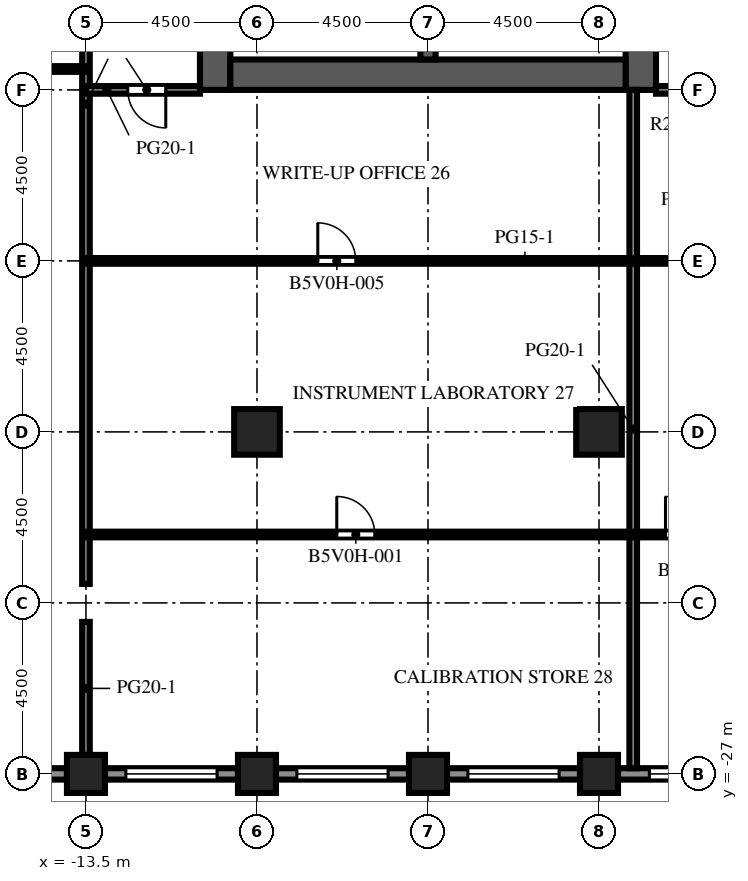
"""IFC4 building model, lengths in metres.
Left out: names, types, materials, properties, quantities, classifications, styles, units other than length and angle.
Written with IfcOpenShell. Run it as: python <this file> out.ifc"""

import sys

from ifc_helpers import new_model, si_unit, direction, frame, frame_2d, origin, origin_2d, place, context, subcontext, project, spatial, rectangle, extrude, element, fill, save


model = new_model("IFC4")
c1 = context("Model", 3, precision=1e-05, world=origin(), true_north=direction((0.0, 1.0)))
c2 = subcontext(c1, "Body", "Model", "MODEL_VIEW")
j1 = project(units=[si_unit("LENGTHUNIT", "METRE"), si_unit("PLANEANGLEUNIT", "RADIAN")], contexts=[c1])
p1 = place(None, origin())
s1 = spatial("IfcSite", under=j1, at=p1, CompositionType="ELEMENT")
p2 = place(p1, origin())
s2 = spatial("IfcBuilding", under=s1, at=p2, CompositionType="ELEMENT")
p3 = place(p2, frame((0.0, 0.0, 156.8)))
s3 = spatial("IfcBuildingStorey", under=s2, at=p3, CompositionType="ELEMENT", Elevation=156.8)
for number, where, z_axis, x_axis in (
    (1, (-13.5, -27.0, -0.45), (0.0, 0.0, 1.0), (1.0, 0.0, 0.0)),
    (2, (-9.0, -27.0, -0.45), (0.0, 0.0, 1.0), (1.0, 0.0, 0.0)),
    (3, (-4.5, -27.0, -0.45), (0.0, 0.0, 1.0), (1.0, 0.0, 0.0)),
    (4, (0.0, -27.0, -0.45), (0.0, 0.0, 1.0), (1.0, 0.0, 0.0)),
):
    element("IfcColumn", number, at=place(p3, frame(where, z_axis=z_axis, x_axis=x_axis)), inside=s3, PredefinedType="COLUMN", context=c2, shape_type="SweptSolid", body=[
        extrude(rectangle(XDim=1.0, YDim=1.0, at=origin_2d()), origin(), (0.0, 0.0, 1.0), 4.55),
    ])
for number, where, z_axis, x_axis in (
    (5, (-9.0, -18.0, -0.45), (0.0, 0.0, 1.0), (1.0, 0.0, 0.0)),
    (6, (0.0, -18.0, -0.45), (0.0, 0.0, 1.0), (1.0, 0.0, 0.0)),
):
    element("IfcColumn", number, at=place(p3, frame(where, z_axis=z_axis, x_axis=x_axis)), inside=s3, PredefinedType="COLUMN", context=c2, shape_type="SweptSolid", body=[
        extrude(rectangle(XDim=1.2, YDim=1.2, at=origin_2d()), origin(), (0.0, 0.0, 1.0), 4.55),
    ])
p4 = place(p3, frame((-10.1, -9.0, 0.0), z_axis=(0.0, 0.0, 1.0), x_axis=(0.0, 1.0, 0.0)))
e7 = element("IfcWall", 7, at=p4, inside=s3, PredefinedType="SHEAR", context=c2, shape_type="SweptSolid", body=[
    extrude(rectangle(XDim=27.5, YDim=0.8, at=frame_2d((13.75, 0.0))), origin(), (0.0, 0.0, 1.0), 4.1),
])
p5 = place(p4, frame((12.55, 0.0, 0.0)))
e8 = element("IfcOpeningElement", 8, at=p5, cuts=e7, PredefinedType="OPENING", context=c2, shape_type="SweptSolid", body=[
    extrude(rectangle(XDim=2.4, YDim=2.4, at=frame_2d((1.2, 1.2))), frame((0.0, 0.41, 0.0), z_axis=(0.0, -1.0, 0.0), x_axis=(1.0, 0.0, 0.0)), (0.0, 0.0, 1.0), 0.82),
])
p6 = place(p4, frame((6.825, 0.0, 0.0)))
e9 = element("IfcOpeningElement", 9, at=p6, cuts=e7, PredefinedType="OPENING", context=c2, shape_type="SweptSolid", body=[
    extrude(rectangle(XDim=1.2, YDim=2.1, at=frame_2d((0.6, 1.05))), frame((0.0, 0.41, 0.0), z_axis=(0.0, -1.0, 0.0), x_axis=(1.0, 0.0, 0.0)), (0.0, 0.0, 1.0), 0.82),
])
p7 = place(p4, frame((19.475, 0.0, 0.0)))
e10 = element("IfcOpeningElement", 10, at=p7, cuts=e7, PredefinedType="OPENING", context=c2, shape_type="SweptSolid", body=[
    extrude(rectangle(XDim=1.2, YDim=2.1, at=frame_2d((0.6, 1.05))), frame((0.0, 0.41, 0.0), z_axis=(0.0, -1.0, 0.0), x_axis=(1.0, 0.0, 0.0)), (0.0, 0.0, 1.0), 0.82),
])
p8 = place(p3, frame((1.1, -9.0, 0.0), z_axis=(0.0, 0.0, 1.0), x_axis=(0.0, 1.0, 0.0)))
e11 = element("IfcWall", 11, at=p8, inside=s3, PredefinedType="SHEAR", context=c2, shape_type="SweptSolid", body=[
    extrude(rectangle(XDim=27.5, YDim=0.8, at=frame_2d((13.75, 0.0))), origin(), (0.0, 0.0, 1.0), 4.1),
])
p9 = place(p8, frame((12.55, 0.0, 0.0)))
e12 = element("IfcOpeningElement", 12, at=p9, cuts=e11, PredefinedType="OPENING", context=c2, shape_type="SweptSolid", body=[
    extrude(rectangle(XDim=2.4, YDim=2.4, at=frame_2d((1.2, 1.2))), frame((0.0, 0.41, 0.0), z_axis=(0.0, -1.0, 0.0), x_axis=(1.0, 0.0, 0.0)), (0.0, 0.0, 1.0), 0.82),
])
p10 = place(p8, frame((5.45, 0.0, 0.0)))
e13 = element("IfcOpeningElement", 13, at=p10, cuts=e11, PredefinedType="OPENING", context=c2, shape_type="SweptSolid", body=[
    extrude(rectangle(XDim=1.2, YDim=2.1, at=frame_2d((0.6, 1.05))), frame((0.0, 0.41, 0.0), z_axis=(0.0, -1.0, 0.0), x_axis=(1.0, 0.0, 0.0)), (0.0, 0.0, 1.0), 0.82),
])
p11 = place(p8, frame((19.45, 0.0, 0.0)))
e14 = element("IfcOpeningElement", 14, at=p11, cuts=e11, PredefinedType="OPENING", context=c2, shape_type="SweptSolid", body=[
    extrude(rectangle(XDim=1.0, YDim=2.1, at=frame_2d((0.5, 1.05))), frame((0.0, 0.41, 0.0), z_axis=(0.0, -1.0, 0.0), x_axis=(1.0, 0.0, 0.0)), (0.0, 0.0, 1.0), 0.82),
])
p12 = place(p8, frame((21.137, 0.0, 0.0)))
e15 = element("IfcOpeningElement", 15, at=p12, cuts=e11, PredefinedType="OPENING", context=c2, shape_type="SweptSolid", body=[
    extrude(rectangle(XDim=1.0, YDim=2.1, at=frame_2d((0.5, 1.05))), frame((0.0, 0.41, 0.0), z_axis=(0.0, -1.0, 0.0), x_axis=(1.0, 0.0, 0.0)), (0.0, 0.0, 1.0), 0.82),
])
p13 = place(p8, frame((23.2, 0.0, 0.0)))
e16 = element("IfcOpeningElement", 16, at=p13, cuts=e11, PredefinedType="OPENING", context=c2, shape_type="SweptSolid", body=[
    extrude(rectangle(XDim=1.0, YDim=2.1, at=frame_2d((0.5, 1.05))), frame((0.0, 0.41, 0.0), z_axis=(0.0, -1.0, 0.0), x_axis=(1.0, 0.0, 0.0)), (0.0, 0.0, 1.0), 0.82),
])
p14 = place(p8, frame((25.262, 0.0, 0.0)))
e17 = element("IfcOpeningElement", 17, at=p14, cuts=e11, PredefinedType="OPENING", context=c2, shape_type="SweptSolid", body=[
    extrude(rectangle(XDim=1.0, YDim=2.1, at=frame_2d((0.5, 1.05))), frame((0.0, 0.41, 0.0), z_axis=(0.0, -1.0, 0.0), x_axis=(1.0, 0.0, 0.0)), (0.0, 0.0, 1.0), 0.82),
])
p15 = place(p3, frame((-9.7, -8.6, 0.0), z_axis=(0.0, 0.0, 1.0), x_axis=(1.0, 0.0, 0.0)))
e18 = element("IfcWall", 18, at=p15, inside=s3, PredefinedType="SHEAR", context=c2, shape_type="SweptSolid", body=[
    extrude(rectangle(XDim=10.4, YDim=0.8, at=frame_2d((5.2, 0.0))), origin(), (0.0, 0.0, 1.0), 4.1),
])
p16 = place(p3, frame((-4.5, -8.2, 0.0), z_axis=(0.0, 0.0, 1.0), x_axis=(0.0, 1.0, 0.0)))
e19 = element("IfcWall", 19, at=p16, inside=s3, PredefinedType="SHEAR", context=c2, shape_type="SweptSolid", body=[
    extrude(rectangle(XDim=7.5, YDim=0.4, at=frame_2d((3.75, 0.0))), origin(), (0.0, 0.0, 1.0), 4.1),
])
p17 = place(p3, frame((-14.0, -27.0, 0.0), z_axis=(0.0, 0.0, 1.0), x_axis=(-1.0, 0.0, 0.0)))
e20 = element("IfcWall", 20, at=p17, inside=s3, PredefinedType="SOLIDWALL", context=c2, shape_type="SweptSolid", body=[
    extrude(rectangle(XDim=3.5, YDim=0.3, at=frame_2d((1.75, 0.0))), origin(), (0.0, 0.0, 1.0), 2.85),
])
p18 = place(p17, frame((1.25, 0.0, 0.0)))
e21 = element("IfcOpeningElement", 21, at=p18, cuts=e20, PredefinedType="OPENING", context=c2, shape_type="SweptSolid", body=[
    extrude(rectangle(XDim=1.0, YDim=2.2, at=frame_2d((0.5, 1.1))), frame((0.0, 0.16, 0.0), z_axis=(0.0, -1.0, 0.0), x_axis=(1.0, 0.0, 0.0)), (0.0, 0.0, 1.0), 0.32),
])
p19 = place(p3, frame((-9.5, -27.0, 0.0), z_axis=(0.0, 0.0, 1.0), x_axis=(-1.0, 0.0, 0.0)))
e22 = element("IfcWall", 22, at=p19, inside=s3, PredefinedType="SOLIDWALL", context=c2, shape_type="SweptSolid", body=[
    extrude(rectangle(XDim=3.5, YDim=0.3, at=frame_2d((1.75, 0.0))), origin(), (0.0, 0.0, 1.0), 2.85),
])
p20 = place(p19, frame((0.55, 0.0, 0.8)))
e23 = element("IfcOpeningElement", 23, at=p20, cuts=e22, PredefinedType="OPENING", context=c2, shape_type="SweptSolid", body=[
    extrude(rectangle(XDim=2.4, YDim=1.7, at=frame_2d((1.2, 0.85))), frame((0.0, 0.16, 0.0), z_axis=(0.0, -1.0, 0.0), x_axis=(1.0, 0.0, 0.0)), (0.0, 0.0, 1.0), 0.32),
])
p21 = place(p3, frame((-5.0, -27.0, 0.0), z_axis=(0.0, 0.0, 1.0), x_axis=(-1.0, 0.0, 0.0)))
e24 = element("IfcWall", 24, at=p21, inside=s3, PredefinedType="SOLIDWALL", context=c2, shape_type="SweptSolid", body=[
    extrude(rectangle(XDim=3.5, YDim=0.3, at=frame_2d((1.75, 0.0))), origin(), (0.0, 0.0, 1.0), 2.85),
])
p22 = place(p21, frame((0.55, 0.0, 0.8)))
e25 = element("IfcOpeningElement", 25, at=p22, cuts=e24, PredefinedType="OPENING", context=c2, shape_type="SweptSolid", body=[
    extrude(rectangle(XDim=2.4, YDim=1.7, at=frame_2d((1.2, 0.85))), frame((0.0, 0.16, 0.0), z_axis=(0.0, -1.0, 0.0), x_axis=(1.0, 0.0, 0.0)), (0.0, 0.0, 1.0), 0.32),
])
p23 = place(p3, frame((-0.5, -27.0, 0.0), z_axis=(0.0, 0.0, 1.0), x_axis=(-1.0, 0.0, 0.0)))
e26 = element("IfcWall", 26, at=p23, inside=s3, PredefinedType="SOLIDWALL", context=c2, shape_type="SweptSolid", body=[
    extrude(rectangle(XDim=3.5, YDim=0.3, at=frame_2d((1.75, 0.0))), origin(), (0.0, 0.0, 1.0), 2.85),
])
p24 = place(p23, frame((0.55, 0.0, 0.8)))
e27 = element("IfcOpeningElement", 27, at=p24, cuts=e26, PredefinedType="OPENING", context=c2, shape_type="SweptSolid", body=[
    extrude(rectangle(XDim=2.4, YDim=1.7, at=frame_2d((1.2, 0.85))), frame((0.0, 0.16, 0.0), z_axis=(0.0, -1.0, 0.0), x_axis=(1.0, 0.0, 0.0)), (0.0, 0.0, 1.0), 0.32),
])
p25 = place(p3, frame((4.0, -27.0, 0.0), z_axis=(0.0, 0.0, 1.0), x_axis=(-1.0, 0.0, 0.0)))
e28 = element("IfcWall", 28, at=p25, inside=s3, PredefinedType="SOLIDWALL", context=c2, shape_type="SweptSolid", body=[
    extrude(rectangle(XDim=3.5, YDim=0.3, at=frame_2d((1.75, 0.0))), origin(), (0.0, 0.0, 1.0), 2.85),
])
p26 = place(p25, frame((0.275, 0.0, 0.8)))
e29 = element("IfcOpeningElement", 29, at=p26, cuts=e28, PredefinedType="OPENING", context=c2, shape_type="SweptSolid", body=[
    extrude(rectangle(XDim=2.4, YDim=1.7, at=frame_2d((1.2, 0.85))), frame((0.0, 0.16, 0.0), z_axis=(0.0, -1.0, 0.0), x_axis=(1.0, 0.0, 0.0)), (0.0, 0.0, 1.0), 0.32),
])
p27 = place(p3, frame((-13.5, -26.5, 0.0), z_axis=(0.0, 0.0, 1.0), x_axis=(0.0, 1.0, 0.0)))
e30 = element("IfcWall", 30, at=p27, inside=s3, PredefinedType="PARTITIONING", context=c2, shape_type="SweptSolid", body=[
    extrude(rectangle(XDim=3.5, YDim=0.2, at=frame_2d((1.75, 0.0))), origin(), (0.0, 0.0, 1.0), 3.65),
])
p28 = place(p3, frame((-13.5, -22.0, 0.0), z_axis=(0.0, 0.0, 1.0), x_axis=(0.0, 1.0, 0.0)))
e31 = element("IfcWall", 31, at=p28, inside=s3, PredefinedType="PARTITIONING", context=c2, shape_type="SweptSolid", body=[
    extrude(rectangle(XDim=25.25, YDim=0.2, at=frame_2d((12.625, 0.0))), origin(), (0.0, 0.0, 1.0), 3.65),
])
p29 = place(p3, frame((0.9, -26.85, 0.0), z_axis=(0.0, 0.0, 1.0), x_axis=(0.0, 1.0, 0.0)))
e32 = element("IfcWall", 32, at=p29, inside=s3, PredefinedType="PARTITIONING", context=c2, shape_type="SweptSolid", body=[
    extrude(rectangle(XDim=17.85, YDim=0.2, at=frame_2d((8.925, 0.0))), origin(), (0.0, 0.0, 1.0), 3.65),
])
p30 = place(p3, frame((21.0, -20.7, 0.0), z_axis=(0.0, 0.0, 1.0), x_axis=(-1.0, 0.0, 0.0)))
e33 = element("IfcWall", 33, at=p30, inside=s3, PredefinedType="PARTITIONING", context=c2, shape_type="SweptSolid", body=[
    extrude(rectangle(XDim=34.5, YDim=0.15, at=frame_2d((17.25, 0.0))), origin(), (0.0, 0.0, 1.0), 3.65),
])
p31 = place(p30, frame((26.9, 0.0, 0.0)))
e34 = element("IfcOpeningElement", 34, at=p31, cuts=e33, PredefinedType="OPENING", context=c2, shape_type="SweptSolid", body=[
    extrude(rectangle(XDim=1.0, YDim=2.1, at=frame_2d((0.5, 1.05))), frame((0.0, 0.085, 0.0), z_axis=(0.0, -1.0, 0.0), x_axis=(1.0, 0.0, 0.0)), (0.0, 0.0, 1.0), 0.17),
])
p32 = place(p30, frame((18.25, 0.0, 0.0)))
e35 = element("IfcOpeningElement", 35, at=p32, cuts=e33, PredefinedType="OPENING", context=c2, shape_type="SweptSolid", body=[
    extrude(rectangle(XDim=1.0, YDim=2.1, at=frame_2d((0.5, 1.05))), frame((0.0, 0.085, 0.0), z_axis=(0.0, -1.0, 0.0), x_axis=(1.0, 0.0, 0.0)), (0.0, 0.0, 1.0), 0.17),
])
p33 = place(p30, frame((12.65, 0.0, 0.0)))
e36 = element("IfcOpeningElement", 36, at=p33, cuts=e33, PredefinedType="OPENING", context=c2, shape_type="SweptSolid", body=[
    extrude(rectangle(XDim=1.0, YDim=2.1, at=frame_2d((0.5, 1.05))), frame((0.0, 0.085, 0.0), z_axis=(0.0, -1.0, 0.0), x_axis=(1.0, 0.0, 0.0)), (0.0, 0.0, 1.0), 0.17),
])
p34 = place(p30, frame((1.4, 0.0, 0.0)))
e37 = element("IfcOpeningElement", 37, at=p34, cuts=e33, PredefinedType="OPENING", context=c2, shape_type="SweptSolid", body=[
    extrude(rectangle(XDim=1.0, YDim=2.1, at=frame_2d((0.5, 1.05))), frame((0.0, 0.085, 0.0), z_axis=(0.0, -1.0, 0.0), x_axis=(1.0, 0.0, 0.0)), (0.0, 0.0, 1.0), 0.17),
])
p35 = place(p3, frame((21.0, -13.5, 0.0), z_axis=(0.0, 0.0, 1.0), x_axis=(-1.0, 0.0, 0.0)))
e38 = element("IfcWall", 38, at=p35, inside=s3, PredefinedType="PARTITIONING", context=c2, shape_type="SweptSolid", body=[
    extrude(rectangle(XDim=34.5, YDim=0.15, at=frame_2d((17.25, 0.0))), origin(), (0.0, 0.0, 1.0), 3.65),
])
p36 = place(p35, frame((27.4, 0.0, 0.0)))
e39 = element("IfcOpeningElement", 39, at=p36, cuts=e38, PredefinedType="OPENING", context=c2, shape_type="SweptSolid", body=[
    extrude(rectangle(XDim=1.0, YDim=2.1, at=frame_2d((0.5, 1.05))), frame((0.0, 0.085, 0.0), z_axis=(0.0, -1.0, 0.0), x_axis=(1.0, 0.0, 0.0)), (0.0, 0.0, 1.0), 0.17),
])
p37 = place(p35, frame((17.5, 0.0, 0.0)))
e40 = element("IfcOpeningElement", 40, at=p37, cuts=e38, PredefinedType="OPENING", context=c2, shape_type="SweptSolid", body=[
    extrude(rectangle(XDim=1.0, YDim=2.1, at=frame_2d((0.5, 1.05))), frame((0.0, 0.085, 0.0), z_axis=(0.0, -1.0, 0.0), x_axis=(1.0, 0.0, 0.0)), (0.0, 0.0, 1.0), 0.17),
])
p38 = place(p35, frame((10.4, 0.0, 0.0)))
e41 = element("IfcOpeningElement", 41, at=p38, cuts=e38, PredefinedType="OPENING", context=c2, shape_type="SweptSolid", body=[
    extrude(rectangle(XDim=1.0, YDim=2.1, at=frame_2d((0.5, 1.05))), frame((0.0, 0.085, 0.0), z_axis=(0.0, -1.0, 0.0), x_axis=(1.0, 0.0, 0.0)), (0.0, 0.0, 1.0), 0.17),
])
p39 = place(p35, frame((3.65, 0.0, 0.0)))
e42 = element("IfcOpeningElement", 42, at=p39, cuts=e38, PredefinedType="OPENING", context=c2, shape_type="SweptSolid", body=[
    extrude(rectangle(XDim=1.0, YDim=2.1, at=frame_2d((0.5, 1.05))), frame((0.0, 0.085, 0.0), z_axis=(0.0, -1.0, 0.0), x_axis=(1.0, 0.0, 0.0)), (0.0, 0.0, 1.0), 0.17),
])
p40 = place(p3, frame((-10.5, -9.0, 0.0), z_axis=(0.0, 0.0, 1.0), x_axis=(-1.0, 0.0, 0.0)))
e43 = element("IfcWall", 43, at=p40, inside=s3, PredefinedType="PARTITIONING", context=c2, shape_type="SweptSolid", body=[
    extrude(rectangle(XDim=3.0, YDim=0.2, at=frame_2d((1.5, 0.0))), origin(), (0.0, 0.0, 1.0), 3.65),
])
p41 = place(p40, frame((0.9, 0.0, 0.0)))
e44 = element("IfcOpeningElement", 44, at=p41, cuts=e43, PredefinedType="OPENING", context=c2, shape_type="SweptSolid", body=[
    extrude(rectangle(XDim=1.0, YDim=2.1, at=frame_2d((0.5, 1.05))), frame((0.0, 0.11, 0.0), z_axis=(0.0, -1.0, 0.0), x_axis=(1.0, 0.0, 0.0)), (0.0, 0.0, 1.0), 0.22),
])
p42 = place(p3, frame((6.0, -9.0, 0.0), z_axis=(0.0, 0.0, 1.0), x_axis=(-1.0, 0.0, 0.0)))
e45 = element("IfcWall", 45, at=p42, inside=s3, PredefinedType="PARTITIONING", context=c2, shape_type="SweptSolid", body=[
    extrude(rectangle(XDim=4.5, YDim=0.2, at=frame_2d((2.25, 0.0))), origin(), (0.0, 0.0, 1.0), 3.65),
])
p43 = place(p42, frame((1.65, 0.0, 0.0)))
e46 = element("IfcOpeningElement", 46, at=p43, cuts=e45, PredefinedType="OPENING", context=c2, shape_type="SweptSolid", body=[
    extrude(rectangle(XDim=1.0, YDim=2.1, at=frame_2d((0.5, 1.05))), frame((0.0, 0.11, 0.0), z_axis=(0.0, -1.0, 0.0), x_axis=(1.0, 0.0, 0.0)), (0.0, 0.0, 1.0), 0.22),
])
p44 = place(p3, frame((-17.4, -8.45, 0.0), z_axis=(0.0, 0.0, 1.0), x_axis=(1.0, 0.0, 0.0)))
e47 = element("IfcWall", 47, at=p44, inside=s3, PredefinedType="PARTITIONING", context=c2, shape_type="SweptSolid", body=[
    extrude(rectangle(XDim=3.9, YDim=0.15, at=frame_2d((1.95, 0.0))), origin(), (0.0, 0.0, 1.0), 3.65),
])
p45 = place(p20, origin())
e48 = element("IfcWindow", 48, at=p45, inside=s3, PartitioningType="SINGLE_PANEL", PredefinedType="WINDOW", context=c2, shape_type="SweptSolid", body=[
    extrude(rectangle(XDim=2.4, YDim=1.7, at=frame_2d((1.2, 0.85))), frame((0.0, 0.03, 0.0), z_axis=(0.0, -1.0, 0.0), x_axis=(1.0, 0.0, 0.0)), (0.0, 0.0, 1.0), 0.06),
])
fill(e23, e48)
p46 = place(p22, origin())
e49 = element("IfcWindow", 49, at=p46, inside=s3, PartitioningType="SINGLE_PANEL", PredefinedType="WINDOW", context=c2, shape_type="SweptSolid", body=[
    extrude(rectangle(XDim=2.4, YDim=1.7, at=frame_2d((1.2, 0.85))), frame((0.0, 0.03, 0.0), z_axis=(0.0, -1.0, 0.0), x_axis=(1.0, 0.0, 0.0)), (0.0, 0.0, 1.0), 0.06),
])
fill(e25, e49)
p47 = place(p24, origin())
e50 = element("IfcWindow", 50, at=p47, inside=s3, PartitioningType="SINGLE_PANEL", PredefinedType="WINDOW", context=c2, shape_type="SweptSolid", body=[
    extrude(rectangle(XDim=2.4, YDim=1.7, at=frame_2d((1.2, 0.85))), frame((0.0, 0.03, 0.0), z_axis=(0.0, -1.0, 0.0), x_axis=(1.0, 0.0, 0.0)), (0.0, 0.0, 1.0), 0.06),
])
fill(e27, e50)
p48 = place(p26, origin())
e51 = element("IfcWindow", 51, at=p48, inside=s3, PartitioningType="SINGLE_PANEL", PredefinedType="WINDOW", context=c2, shape_type="SweptSolid", body=[
    extrude(rectangle(XDim=2.4, YDim=1.7, at=frame_2d((1.2, 0.85))), frame((0.0, 0.03, 0.0), z_axis=(0.0, -1.0, 0.0), x_axis=(1.0, 0.0, 0.0)), (0.0, 0.0, 1.0), 0.06),
])
fill(e29, e51)
p49 = place(p31, origin())
e52 = element("IfcDoor", 52, at=p49, inside=s3, OperationType="SINGLE_SWING_RIGHT", PredefinedType="DOOR", context=c2, shape_type="SweptSolid", body=[
    extrude(rectangle(XDim=1.0, YDim=2.1, at=frame_2d((0.5, 1.05))), frame((0.0, 0.025, 0.0), z_axis=(0.0, -1.0, 0.0), x_axis=(1.0, 0.0, 0.0)), (0.0, 0.0, 1.0), 0.05),
])
fill(e34, e52)
p50 = place(p32, origin())
e53 = element("IfcDoor", 53, at=p50, inside=s3, OperationType="SINGLE_SWING_RIGHT", PredefinedType="DOOR", context=c2, shape_type="SweptSolid", body=[
    extrude(rectangle(XDim=1.0, YDim=2.1, at=frame_2d((0.5, 1.05))), frame((0.0, 0.025, 0.0), z_axis=(0.0, -1.0, 0.0), x_axis=(1.0, 0.0, 0.0)), (0.0, 0.0, 1.0), 0.05),
])
fill(e35, e53)
p51 = place(p36, origin())
e54 = element("IfcDoor", 54, at=p51, inside=s3, OperationType="SINGLE_SWING_RIGHT", PredefinedType="DOOR", context=c2, shape_type="SweptSolid", body=[
    extrude(rectangle(XDim=1.0, YDim=2.1, at=frame_2d((0.5, 1.05))), frame((0.0, 0.025, 0.0), z_axis=(0.0, -1.0, 0.0), x_axis=(1.0, 0.0, 0.0)), (0.0, 0.0, 1.0), 0.05),
])
fill(e39, e54)
p52 = place(p41, origin())
e55 = element("IfcDoor", 55, at=p52, inside=s3, OperationType="SINGLE_SWING_LEFT", PredefinedType="DOOR", context=c2, shape_type="SweptSolid", body=[
    extrude(rectangle(XDim=1.0, YDim=2.1, at=frame_2d((0.5, 1.05))), frame((0.0, 0.025, 0.0), z_axis=(0.0, -1.0, 0.0), x_axis=(1.0, 0.0, 0.0)), (0.0, 0.0, 1.0), 0.05),
])
fill(e44, e55)
save(model, sys.argv[1])
